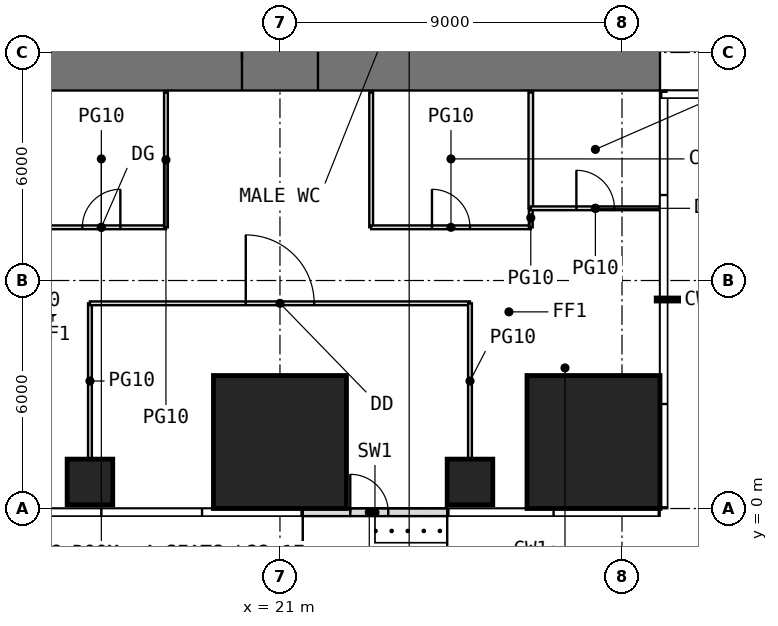
"""IFC4 building model, lengths in metres.
Left out: names, types, materials, properties, quantities, classifications, styles, units other than length and angle.
Written with IfcOpenShell. Run it as: python <this file> out.ifc"""

import sys

from ifc_helpers import new_model, si_unit, direction, frame, frame_2d, origin, origin_2d, place, context, subcontext, project, spatial, rectangle, extrude, element, fill, save


model = new_model("IFC4")
c1 = context("Model", 3, precision=1e-05, world=origin(), true_north=direction((0.0, 1.0)))
c2 = subcontext(c1, "Body", "Model", "MODEL_VIEW")
j1 = project(units=[si_unit("LENGTHUNIT", "METRE"), si_unit("PLANEANGLEUNIT", "RADIAN")], contexts=[c1])
p1 = place(None, origin())
s1 = spatial("IfcSite", under=j1, at=p1, CompositionType="ELEMENT")
p2 = place(p1, origin())
s2 = spatial("IfcBuilding", under=s1, at=p2, CompositionType="ELEMENT")
p3 = place(p2, frame((0.0, 0.0, 96.5)))
s3 = spatial("IfcBuildingStorey", under=s2, at=p3, CompositionType="ELEMENT", Elevation=96.5)
p4 = place(p3, frame((16.0, 0.7, 0.0), z_axis=(0.0, 0.0, 1.0), x_axis=(1.0, 0.0, 0.0)))
e1 = element("IfcColumn", 1, at=p4, inside=s3, PredefinedType="COLUMN", context=c2, shape_type="SweptSolid", body=[
    extrude(rectangle(XDim=1.2, YDim=1.2, at=origin_2d()), origin(), (0.0, 0.0, 1.0), 4.0),
])
p5 = place(p3, frame((21.0, 1.75, 0.0), z_axis=(0.0, 0.0, 1.0), x_axis=(1.0, 0.0, 0.0)))
e2 = element("IfcColumn", 2, at=p5, inside=s3, PredefinedType="COLUMN", context=c2, shape_type="SweptSolid", body=[
    extrude(rectangle(XDim=3.5, YDim=3.5, at=origin_2d()), origin(), (0.0, 0.0, 1.0), 4.0),
])
p6 = place(p3, frame((26.0, 0.7, 0.0), z_axis=(0.0, 0.0, 1.0), x_axis=(1.0, 0.0, 0.0)))
e3 = element("IfcColumn", 3, at=p6, inside=s3, PredefinedType="COLUMN", context=c2, shape_type="SweptSolid", body=[
    extrude(rectangle(XDim=1.2, YDim=1.2, at=origin_2d()), origin(), (0.0, 0.0, 1.0), 4.0),
])
p7 = place(p3, frame((29.25, 1.75, 0.0), z_axis=(0.0, 0.0, 1.0), x_axis=(1.0, 0.0, 0.0)))
e4 = element("IfcColumn", 4, at=p7, inside=s3, PredefinedType="COLUMN", context=c2, shape_type="SweptSolid", body=[
    extrude(rectangle(XDim=3.5, YDim=3.5, at=origin_2d()), origin(), (0.0, 0.0, 1.0), 4.0),
])
p8 = place(p3, frame((21.6, -0.1, 0.0), z_axis=(0.0, 0.0, 1.0), x_axis=(1.0, 0.0, 0.0)))
e5 = element("IfcWall", 5, at=p8, inside=s3, PredefinedType="USERDEFINED", context=c2, shape_type="SweptSolid", body=[
    extrude(rectangle(XDim=3.8, YDim=0.2, at=frame_2d((1.9, 0.0))), origin(), (0.0, 0.0, 1.0), 3.75),
])
p9 = place(p8, frame((1.25, 0.0, 0.0)))
e6 = element("IfcOpeningElement", 6, at=p9, cuts=e5, PredefinedType="OPENING", context=c2, shape_type="SweptSolid", body=[
    extrude(rectangle(XDim=1.0, YDim=2.4, at=frame_2d((0.5, 1.2))), frame((0.0, 0.11, 0.0), z_axis=(0.0, -1.0, 0.0), x_axis=(1.0, 0.0, 0.0)), (0.0, 0.0, 1.0), 0.22),
])
p10 = place(p3, frame((11.0, 11.8, -0.05), z_axis=(0.0, 0.0, 1.0), x_axis=(1.0, 0.0, 0.0)))
e7 = element("IfcWall", 7, at=p10, inside=s3, PredefinedType="SHEAR", context=c2, shape_type="SweptSolid", body=[
    extrude(rectangle(XDim=20.0, YDim=1.6, at=frame_2d((10.0, 0.0))), origin(), (0.0, 0.0, 1.0), 4.0),
])
p11 = place(p10, frame((9.0, 0.0, 0.05)))
e8 = element("IfcOpeningElement", 8, at=p11, cuts=e7, PredefinedType="OPENING", context=c2, shape_type="SweptSolid", body=[
    extrude(rectangle(XDim=2.0, YDim=2.2, at=frame_2d((1.0, 1.1))), frame((0.0, 0.81, 0.0), z_axis=(0.0, -1.0, 0.0), x_axis=(1.0, 0.0, 0.0)), (0.0, 0.0, 1.0), 1.62),
])
p12 = place(p3, frame((14.6, 7.4, 0.0), z_axis=(0.0, 0.0, 1.0), x_axis=(1.0, 0.0, 0.0)))
e9 = element("IfcWall", 9, at=p12, inside=s3, PredefinedType="PARTITIONING", context=c2, shape_type="SweptSolid", body=[
    extrude(rectangle(XDim=3.4, YDim=0.1, at=frame_2d((1.7, 0.0))), origin(), (0.0, 0.0, 1.0), 3.75),
])
p13 = place(p12, frame((1.2, 0.0, 0.0)))
e10 = element("IfcOpeningElement", 10, at=p13, cuts=e9, PredefinedType="OPENING", context=c2, shape_type="SweptSolid", body=[
    extrude(rectangle(XDim=1.0, YDim=2.4, at=frame_2d((0.5, 1.2))), frame((0.0, 0.06, 0.0), z_axis=(0.0, -1.0, 0.0), x_axis=(1.0, 0.0, 0.0)), (0.0, 0.0, 1.0), 0.12),
])
p14 = place(p3, frame((16.0, 1.31, 0.0), z_axis=(0.0, 0.0, 1.0), x_axis=(0.0, 1.0, 0.0)))
e11 = element("IfcWall", 11, at=p14, inside=s3, PredefinedType="PARTITIONING", context=c2, shape_type="SweptSolid", body=[
    extrude(rectangle(XDim=4.09, YDim=0.1, at=frame_2d((2.045, 0.0))), origin(), (0.0, 0.0, 1.0), 3.75),
])
p15 = place(p3, frame((16.0, 5.4, 0.0), z_axis=(0.0, 0.0, 1.0), x_axis=(1.0, 0.0, 0.0)))
e12 = element("IfcWall", 12, at=p15, inside=s3, PredefinedType="PARTITIONING", context=c2, shape_type="SweptSolid", body=[
    extrude(rectangle(XDim=10.0, YDim=0.1, at=frame_2d((5.0, 0.0))), origin(), (0.0, 0.0, 1.0), 3.75),
])
p16 = place(p15, frame((4.1, 0.0, 0.0)))
e13 = element("IfcOpeningElement", 13, at=p16, cuts=e12, PredefinedType="OPENING", context=c2, shape_type="SweptSolid", body=[
    extrude(rectangle(XDim=1.8, YDim=2.4, at=frame_2d((0.9, 1.2))), frame((0.0, 0.06, 0.0), z_axis=(0.0, -1.0, 0.0), x_axis=(1.0, 0.0, 0.0)), (0.0, 0.0, 1.0), 0.12),
])
for number, where, z_axis, x_axis in (
    (14, (18.0, 7.4, 0.0), (0.0, 0.0, 1.0), (0.0, 1.0, 0.0)),
    (15, (23.4, 7.4, 0.0), (0.0, 0.0, 1.0), (0.0, 1.0, 0.0)),
):
    element("IfcWall", number, at=place(p3, frame(where, z_axis=z_axis, x_axis=x_axis)), inside=s3, PredefinedType="PARTITIONING", context=c2, shape_type="SweptSolid", body=[
        extrude(rectangle(XDim=3.55, YDim=0.1, at=frame_2d((1.775, 0.0))), origin(), (0.0, 0.0, 1.0), 3.75),
    ])
p17 = place(p3, frame((23.4, 7.4, 0.0), z_axis=(0.0, 0.0, 1.0), x_axis=(1.0, 0.0, 0.0)))
e16 = element("IfcWall", 16, at=p17, inside=s3, PredefinedType="PARTITIONING", context=c2, shape_type="SweptSolid", body=[
    extrude(rectangle(XDim=4.2, YDim=0.1, at=frame_2d((2.1, 0.0))), origin(), (0.0, 0.0, 1.0), 3.75),
])
p18 = place(p17, frame((1.6, 0.0, 0.0)))
e17 = element("IfcOpeningElement", 17, at=p18, cuts=e16, PredefinedType="OPENING", context=c2, shape_type="SweptSolid", body=[
    extrude(rectangle(XDim=1.0, YDim=2.4, at=frame_2d((0.5, 1.2))), frame((0.0, 0.06, 0.0), z_axis=(0.0, -1.0, 0.0), x_axis=(1.0, 0.0, 0.0)), (0.0, 0.0, 1.0), 0.12),
])
p19 = place(p3, frame((26.0, 1.31, 0.0), z_axis=(0.0, 0.0, 1.0), x_axis=(0.0, 1.0, 0.0)))
e18 = element("IfcWall", 18, at=p19, inside=s3, PredefinedType="PARTITIONING", context=c2, shape_type="SweptSolid", body=[
    extrude(rectangle(XDim=4.09, YDim=0.1, at=frame_2d((2.045, 0.0))), origin(), (0.0, 0.0, 1.0), 3.75),
])
p20 = place(p3, frame((27.6, 7.4, 0.0), z_axis=(0.0, 0.0, 1.0), x_axis=(0.0, 1.0, 0.0)))
e19 = element("IfcWall", 19, at=p20, inside=s3, PredefinedType="PARTITIONING", context=c2, shape_type="SweptSolid", body=[
    extrude(rectangle(XDim=0.5, YDim=0.1, at=frame_2d((0.25, 0.0))), origin(), (0.0, 0.0, 1.0), 3.75),
])
p21 = place(p3, frame((27.6, 7.9, 0.0), z_axis=(0.0, 0.0, 1.0), x_axis=(0.0, 1.0, 0.0)))
e20 = element("IfcWall", 20, at=p21, inside=s3, PredefinedType="PARTITIONING", context=c2, shape_type="SweptSolid", body=[
    extrude(rectangle(XDim=3.05, YDim=0.12, at=frame_2d((1.525, 0.0))), origin(), (0.0, 0.0, 1.0), 3.75),
])
p22 = place(p3, frame((27.6, 7.9, 0.0), z_axis=(0.0, 0.0, 1.0), x_axis=(1.0, 0.0, 0.0)))
e21 = element("IfcWall", 21, at=p22, inside=s3, PredefinedType="PARTITIONING", context=c2, shape_type="SweptSolid", body=[
    extrude(rectangle(XDim=3.4, YDim=0.1, at=frame_2d((1.7, 0.0))), origin(), (0.0, 0.0, 1.0), 3.75),
])
p23 = place(p22, frame((1.2, 0.0, 0.0)))
e22 = element("IfcOpeningElement", 22, at=p23, cuts=e21, PredefinedType="OPENING", context=c2, shape_type="SweptSolid", body=[
    extrude(rectangle(XDim=1.0, YDim=2.4, at=frame_2d((0.5, 1.2))), frame((0.0, 0.06, 0.0), z_axis=(0.0, -1.0, 0.0), x_axis=(1.0, 0.0, 0.0)), (0.0, 0.0, 1.0), 0.12),
])
p24 = place(p9, origin())
e23 = element("IfcDoor", 23, at=p24, inside=s3, OperationType="SINGLE_SWING_LEFT", PredefinedType="DOOR", context=c2, shape_type="SweptSolid", body=[
    extrude(rectangle(XDim=1.0, YDim=2.4, at=frame_2d((0.5, 1.2))), frame((0.0, 0.025, 0.0), z_axis=(0.0, -1.0, 0.0), x_axis=(1.0, 0.0, 0.0)), (0.0, 0.0, 1.0), 0.05),
])
fill(e6, e23)
p25 = place(p11, origin())
e24 = element("IfcDoor", 24, at=p25, inside=s3, OperationType="DOUBLE_DOOR_SINGLE_SWING", PredefinedType="DOOR", context=c2, shape_type="SweptSolid", body=[
    extrude(rectangle(XDim=2.0, YDim=2.2, at=frame_2d((1.0, 1.1))), frame((0.0, 0.025, 0.0), z_axis=(0.0, -1.0, 0.0), x_axis=(1.0, 0.0, 0.0)), (0.0, 0.0, 1.0), 0.05),
])
fill(e8, e24)
p26 = place(p13, origin())
e25 = element("IfcDoor", 25, at=p26, inside=s3, OperationType="SINGLE_SWING_RIGHT", PredefinedType="DOOR", context=c2, shape_type="SweptSolid", body=[
    extrude(rectangle(XDim=1.0, YDim=2.4, at=frame_2d((0.5, 1.2))), frame((0.0, 0.025, 0.0), z_axis=(0.0, -1.0, 0.0), x_axis=(1.0, 0.0, 0.0)), (0.0, 0.0, 1.0), 0.05),
])
fill(e10, e25)
p27 = place(p18, origin())
e26 = element("IfcDoor", 26, at=p27, inside=s3, OperationType="SINGLE_SWING_LEFT", PredefinedType="DOOR", context=c2, shape_type="SweptSolid", body=[
    extrude(rectangle(XDim=1.0, YDim=2.4, at=frame_2d((0.5, 1.2))), frame((0.0, 0.025, 0.0), z_axis=(0.0, -1.0, 0.0), x_axis=(1.0, 0.0, 0.0)), (0.0, 0.0, 1.0), 0.05),
])
fill(e17, e26)
p28 = place(p23, origin())
e27 = element("IfcDoor", 27, at=p28, inside=s3, OperationType="SINGLE_SWING_LEFT", PredefinedType="DOOR", context=c2, shape_type="SweptSolid", body=[
    extrude(rectangle(XDim=1.0, YDim=2.4, at=frame_2d((0.5, 1.2))), frame((0.0, 0.025, 0.0), z_axis=(0.0, -1.0, 0.0), x_axis=(1.0, 0.0, 0.0)), (0.0, 0.0, 1.0), 0.05),
])
fill(e22, e27)
p29 = place(p16, origin())
e28 = element("IfcDoor", 28, at=p29, inside=s3, OperationType="DOUBLE_DOOR_SINGLE_SWING", PredefinedType="DOOR", context=c2, shape_type="SweptSolid", body=[
    extrude(rectangle(XDim=1.8, YDim=2.4, at=frame_2d((0.9, 1.2))), frame((0.0, 0.025, 0.0), z_axis=(0.0, -1.0, 0.0), x_axis=(1.0, 0.0, 0.0)), (0.0, 0.0, 1.0), 0.05),
])
fill(e13, e28)
save(model, sys.argv[1])
